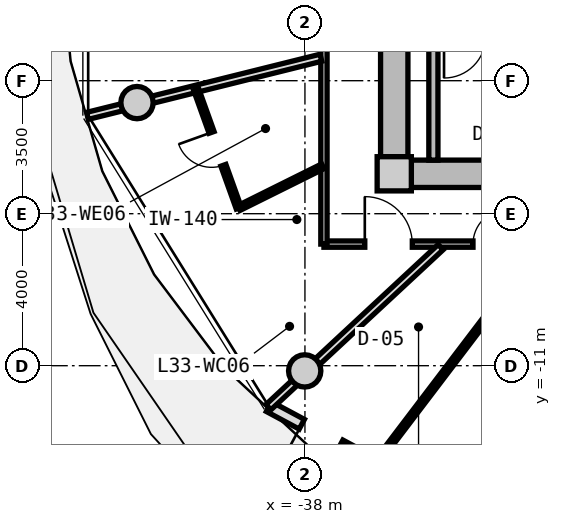
"""IFC4 building model, lengths in metres.
Left out: names, types, materials, properties, quantities, classifications, styles, units other than length and angle.
Written with IfcOpenShell. Run it as: python <this file> out.ifc"""

import sys

from ifc_helpers import new_model, si_unit, direction, frame, frame_2d, origin, origin_2d, place, context, subcontext, project, spatial, rectangle, circle, extrude, source, transform, mapped, element, fill, save


model = new_model("IFC4")
c1 = context("Model", 3, precision=1e-05, world=origin(), true_north=direction((0.0, 1.0)))
c2 = subcontext(c1, "Body", "Model", "MODEL_VIEW")
j1 = project(units=[si_unit("LENGTHUNIT", "METRE"), si_unit("PLANEANGLEUNIT", "RADIAN")], contexts=[c1])
p1 = place(None, origin())
s1 = spatial("IfcSite", under=j1, at=p1, CompositionType="ELEMENT")
p2 = place(p1, origin())
s2 = spatial("IfcBuilding", under=s1, at=p2, CompositionType="ELEMENT")
p3 = place(p2, frame((0.0, 0.0, 108.45)))
s3 = spatial("IfcBuildingStorey", under=s2, at=p3, CompositionType="ELEMENT", Elevation=108.45)
m1 = source(origin(), c2, "Body", "SweptSolid", [
    extrude(rectangle(XDim=0.9, YDim=0.9, at=origin_2d()), origin(), (0.0, 0.0, 1.0), 3.05),
])
p4 = place(p3, frame((-35.65, -5.95, 0.0), z_axis=(0.0, 0.0, 1.0), x_axis=(1.0, 0.0, 0.0)))
e1 = element("IfcColumn", 1, at=p4, inside=s3, PredefinedType="COLUMN", context=c2, shape_type="MappedRepresentation", body=[
    mapped(m1, transform((0.0, 0.0, 0.0), x_axis=(1.0, 0.0, 0.0), y_axis=(0.0, 1.0, 0.0), z_axis=(0.0, 0.0, 1.0), scale=1.0)),
])
m2 = source(origin(), c2, "Body", "SweptSolid", [
    extrude(rectangle(XDim=14.4, YDim=0.72, at=frame_2d((7.2, 0.0))), origin(), (0.0, 0.0, 1.0), 2.79),
])
p5 = place(p3, frame((-20.8, -5.95, 0.0), z_axis=(0.0, 0.0, 1.0), x_axis=(-1.0, 0.0, 0.0)))
e2 = element("IfcWall", 2, at=p5, inside=s3, PredefinedType="SHEAR", context=c2, shape_type="MappedRepresentation", body=[
    mapped(m2, transform((0.0, 0.0, 0.0), x_axis=(1.0, 0.0, 0.0), y_axis=(0.0, 1.0, 0.0), z_axis=(0.0, 0.0, 1.0), scale=1.0)),
])
m3 = source(origin(), c2, "Body", "SweptSolid", [
    extrude(rectangle(XDim=11.0, YDim=0.72, at=frame_2d((5.5, 0.0))), origin(), (0.0, 0.0, 1.0), 2.79),
])
p6 = place(p3, frame((-35.65, -5.5, 0.0), z_axis=(0.0, 0.0, 1.0), x_axis=(0.0, 1.0, 0.0)))
e3 = element("IfcWall", 3, at=p6, inside=s3, PredefinedType="SHEAR", context=c2, shape_type="MappedRepresentation", body=[
    mapped(m3, transform((0.0, 0.0, 0.0), x_axis=(1.0, 0.0, 0.0), y_axis=(0.0, 1.0, 0.0), z_axis=(0.0, 0.0, 1.0), scale=1.0)),
])
p7 = place(p6, frame((3.8, 0.0, 0.0)))
e4 = element("IfcOpeningElement", 4, at=p7, cuts=e3, PredefinedType="OPENING", context=c2, shape_type="SweptSolid", body=[
    extrude(rectangle(XDim=1.2, YDim=2.15, at=frame_2d((0.6, 1.075))), frame((0.0, 0.37, 0.0), z_axis=(0.0, -1.0, 0.0), x_axis=(1.0, 0.0, 0.0)), (0.0, 0.0, 1.0), 0.74),
])
m4 = source(origin(), c2, "Body", "SweptSolid", [
    extrude(circle(Radius=0.425, at=origin_2d()), origin(), (0.0, 0.0, 1.0), 3.05),
])
for number, where, z_axis, x_axis in (
    (5, (-42.419, -4.076, 0.0), (0.0, 0.0, 1.0), (1.0, 0.0, 0.0)),
    (6, (-38.006, -11.137, 0.0), (0.0, 0.0, 1.0), (1.0, 0.0, 0.0)),
):
    element("IfcColumn", number, at=place(p3, frame(where, z_axis=z_axis, x_axis=x_axis)), inside=s3, PredefinedType="COLUMN", context=c2, shape_type="MappedRepresentation", body=[
        mapped(m4, transform((0.0, 0.0, 0.0), x_axis=(1.0, 0.0, 0.0), y_axis=(0.0, 1.0, 0.0), z_axis=(0.0, 0.0, 1.0), scale=1.0)),
    ])
m5 = source(origin(), c2, "Body", "SweptSolid", [
    extrude(rectangle(XDim=9.351, YDim=0.29, at=frame_2d((4.675, 0.0))), origin(), (0.0, 0.0, 1.0), 2.79),
])
p8 = place(p3, frame((-30.707, -16.498, 0.0), z_axis=(0.0, 0.0, 1.0), x_axis=(-0.881184411073, 0.472772708267, 0.0)))
e7 = element("IfcWall", 7, at=p8, inside=s3, PredefinedType="SOLIDWALL", context=c2, shape_type="MappedRepresentation", body=[
    mapped(m5, transform((0.0, 0.0, 0.0), x_axis=(1.0, 0.0, 0.0), y_axis=(0.0, 1.0, 0.0), z_axis=(0.0, 0.0, 1.0), scale=1.0)),
])
p9 = place(p8, frame((7.22, 0.0, 0.0)))
e8 = element("IfcOpeningElement", 8, at=p9, cuts=e7, PredefinedType="OPENING", context=c2, shape_type="SweptSolid", body=[
    extrude(rectangle(XDim=1.15, YDim=2.25, at=frame_2d((0.575, 1.125))), frame((0.0, 0.155, 0.0), z_axis=(0.0, -1.0, 0.0), x_axis=(1.0, 0.0, 0.0)), (0.0, 0.0, 1.0), 0.31),
])
p10 = place(p8, frame((0.85, 0.0, 0.85)))
e9 = element("IfcOpeningElement", 9, at=p10, cuts=e7, PredefinedType="OPENING", context=c2, shape_type="SweptSolid", body=[
    extrude(rectangle(XDim=1.2, YDim=1.5, at=frame_2d((0.6, 0.75))), frame((0.0, 0.155, 0.0), z_axis=(0.0, -1.0, 0.0), x_axis=(1.0, 0.0, 0.0)), (0.0, 0.0, 1.0), 0.31),
])
m6 = source(origin(), c2, "Body", "SweptSolid", [
    extrude(rectangle(XDim=3.14, YDim=0.24, at=frame_2d((1.57, 0.0))), origin(), (0.0, 0.0, 1.0), 2.79),
])
p11 = place(p3, frame((-34.62, -5.59, 0.0), z_axis=(0.0, 0.0, 1.0), x_axis=(0.0, 1.0, 0.0)))
e10 = element("IfcWall", 10, at=p11, inside=s3, PredefinedType="PARTITIONING", context=c2, shape_type="MappedRepresentation", body=[
    mapped(m6, transform((0.0, 0.0, 0.0), x_axis=(1.0, 0.0, 0.0), y_axis=(0.0, 1.0, 0.0), z_axis=(0.0, 0.0, 1.0), scale=1.0)),
])
m7 = source(origin(), c2, "Body", "SweptSolid", [
    extrude(rectangle(XDim=9.234, YDim=0.165, at=frame_2d((4.617, 0.0))), origin(), (0.0, 0.0, 1.0), 2.775),
])
p12 = place(p3, frame((-28.266, -7.8, 0.0), z_axis=(0.0, 0.0, 1.0), x_axis=(-1.0, 0.0, 0.0)))
e11 = element("IfcWall", 11, at=p12, inside=s3, PredefinedType="PARTITIONING", context=c2, shape_type="MappedRepresentation", body=[
    mapped(m7, transform((0.0, 0.0, 0.0), x_axis=(1.0, 0.0, 0.0), y_axis=(0.0, 1.0, 0.0), z_axis=(0.0, 0.0, 1.0), scale=1.0)),
])
p13 = place(p12, frame((6.909, 0.0, 0.0)))
e12 = element("IfcOpeningElement", 12, at=p13, cuts=e11, PredefinedType="OPENING", context=c2, shape_type="SweptSolid", body=[
    extrude(rectangle(XDim=1.25, YDim=2.2, at=frame_2d((0.625, 1.1))), frame((0.0, 0.093, 0.0), z_axis=(0.0, -1.0, 0.0), x_axis=(1.0, 0.0, 0.0)), (0.0, 0.0, 1.0), 0.185),
])
p14 = place(p12, frame((4.392, 0.0, 0.0)))
e13 = element("IfcOpeningElement", 13, at=p14, cuts=e11, PredefinedType="OPENING", context=c2, shape_type="SweptSolid", body=[
    extrude(rectangle(XDim=0.92, YDim=2.1, at=frame_2d((0.46, 1.05))), frame((0.0, 0.093, 0.0), z_axis=(0.0, -1.0, 0.0), x_axis=(1.0, 0.0, 0.0)), (0.0, 0.0, 1.0), 0.185),
])
p15 = place(p12, frame((1.408, 0.0, 0.0)))
e14 = element("IfcOpeningElement", 14, at=p15, cuts=e11, PredefinedType="OPENING", context=c2, shape_type="SweptSolid", body=[
    extrude(rectangle(XDim=0.92, YDim=2.1, at=frame_2d((0.46, 1.05))), frame((0.0, 0.093, 0.0), z_axis=(0.0, -1.0, 0.0), x_axis=(1.0, 0.0, 0.0)), (0.0, 0.0, 1.0), 0.185),
])
m8 = source(origin(), c2, "Body", "SweptSolid", [
    extrude(rectangle(XDim=15.6, YDim=0.165, at=frame_2d((7.8, 0.0))), origin(), (0.0, 0.0, 1.0), 2.775),
])
p16 = place(p3, frame((-37.5, -7.8, 0.0), z_axis=(0.0, 0.0, 1.0), x_axis=(0.0, 1.0, 0.0)))
e15 = element("IfcWall", 15, at=p16, inside=s3, PredefinedType="PARTITIONING", context=c2, shape_type="MappedRepresentation", body=[
    mapped(m8, transform((0.0, 0.0, 0.0), x_axis=(1.0, 0.0, 0.0), y_axis=(0.0, 1.0, 0.0), z_axis=(0.0, 0.0, 1.0), scale=1.0)),
])
p17 = place(p16, frame((11.994, 0.0, 0.0)))
e16 = element("IfcOpeningElement", 16, at=p17, cuts=e15, PredefinedType="OPENING", context=c2, shape_type="SweptSolid", body=[
    extrude(rectangle(XDim=1.25, YDim=2.2, at=frame_2d((0.625, 1.1))), frame((0.0, 0.093, 0.0), z_axis=(0.0, -1.0, 0.0), x_axis=(1.0, 0.0, 0.0)), (0.0, 0.0, 1.0), 0.185),
])
p18 = place(p16, frame((7.984, 0.0, 0.0)))
e17 = element("IfcOpeningElement", 17, at=p18, cuts=e15, PredefinedType="OPENING", context=c2, shape_type="SweptSolid", body=[
    extrude(rectangle(XDim=1.05, YDim=2.15, at=frame_2d((0.525, 1.075))), frame((0.0, 0.093, 0.0), z_axis=(0.0, -1.0, 0.0), x_axis=(1.0, 0.0, 0.0)), (0.0, 0.0, 1.0), 0.185),
])
p19 = place(p16, frame((5.777, 0.0, 0.0)))
e18 = element("IfcOpeningElement", 18, at=p19, cuts=e15, PredefinedType="OPENING", context=c2, shape_type="SweptSolid", body=[
    extrude(rectangle(XDim=1.05, YDim=2.15, at=frame_2d((0.525, 1.075))), frame((0.0, 0.093, 0.0), z_axis=(0.0, -1.0, 0.0), x_axis=(1.0, 0.0, 0.0)), (0.0, 0.0, 1.0), 0.185),
])
m9 = source(origin(), c2, "Body", "SweptSolid", [
    extrude(rectangle(XDim=6.331, YDim=0.19, at=frame_2d((3.165, 0.0))), origin(), (0.0, 0.0, 1.0), 2.275),
])
p20 = place(p3, frame((-37.58, -2.896, 0.0), z_axis=(0.0, 0.0, 1.0), x_axis=(-0.97036440661, -0.241646267062, 0.0)))
e19 = element("IfcWall", 19, at=p20, inside=s3, PredefinedType="PARTITIONING", context=c2, shape_type="MappedRepresentation", body=[
    mapped(m9, transform((0.0, 0.0, 0.0), x_axis=(1.0, 0.0, 0.0), y_axis=(0.0, 1.0, 0.0), z_axis=(0.0, 0.0, 1.0), scale=1.0)),
])
m10 = source(origin(), c2, "Body", "SweptSolid", [
    extrude(rectangle(XDim=6.187, YDim=0.19, at=frame_2d((3.093, 0.0))), origin(), (0.0, 0.0, 1.0), 2.275),
])
p21 = place(p3, frame((-34.429, -7.88, 0.0), z_axis=(0.0, 0.0, 1.0), x_axis=(-0.732501077882, -0.680765870841, 0.0)))
e20 = element("IfcWall", 20, at=p21, inside=s3, PredefinedType="PARTITIONING", context=c2, shape_type="MappedRepresentation", body=[
    mapped(m10, transform((0.0, 0.0, 0.0), x_axis=(1.0, 0.0, 0.0), y_axis=(0.0, 1.0, 0.0), z_axis=(0.0, 0.0, 1.0), scale=1.0)),
])
m11 = source(origin(), c2, "Body", "SweptSolid", [
    extrude(rectangle(XDim=2.469, YDim=0.14, at=frame_2d((1.235, 0.0))), origin(), (0.0, 0.0, 1.0), 2.775),
])
p22 = place(p3, frame((-37.53, -5.754, 0.0), z_axis=(0.0, 0.0, 1.0), x_axis=(-0.895512172456, -0.445037019789, 0.0)))
e21 = element("IfcWall", 21, at=p22, inside=s3, PredefinedType="PARTITIONING", context=c2, shape_type="MappedRepresentation", body=[
    mapped(m11, transform((0.0, 0.0, 0.0), x_axis=(1.0, 0.0, 0.0), y_axis=(0.0, 1.0, 0.0), z_axis=(0.0, 0.0, 1.0), scale=1.0)),
])
m12 = source(origin(), c2, "Body", "SweptSolid", [
    extrude(rectangle(XDim=3.314, YDim=0.14, at=frame_2d((1.657, 0.0))), origin(), (0.0, 0.0, 1.0), 2.775),
])
p23 = place(p3, frame((-39.741, -6.853, 0.0), z_axis=(0.0, 0.0, 1.0), x_axis=(-0.338067217654, 0.941121966776, 0.0)))
e22 = element("IfcWall", 22, at=p23, inside=s3, PredefinedType="PARTITIONING", context=c2, shape_type="MappedRepresentation", body=[
    mapped(m12, transform((0.0, 0.0, 0.0), x_axis=(1.0, 0.0, 0.0), y_axis=(0.0, 1.0, 0.0), z_axis=(0.0, 0.0, 1.0), scale=1.0)),
])
p24 = place(p23, frame((1.197, 0.0, 0.0)))
e23 = element("IfcOpeningElement", 23, at=p24, cuts=e22, PredefinedType="OPENING", context=c2, shape_type="SweptSolid", body=[
    extrude(rectangle(XDim=0.92, YDim=2.1, at=frame_2d((0.46, 1.05))), frame((0.0, 0.08, 0.0), z_axis=(0.0, -1.0, 0.0), x_axis=(1.0, 0.0, 0.0)), (0.0, 0.0, 1.0), 0.16),
])
m13 = source(origin(), c2, "Body", "SweptSolid", [
    extrude(rectangle(XDim=7.243, YDim=0.14, at=frame_2d((3.621, 0.0))), origin(), (0.0, 0.0, 1.0), 2.775),
])
p25 = place(p3, frame((-31.774, -7.83, 0.0), z_axis=(0.0, 0.0, 1.0), x_axis=(-0.605111472002, -0.796140757939, 0.0)))
e24 = element("IfcWall", 24, at=p25, inside=s3, PredefinedType="PARTITIONING", context=c2, shape_type="MappedRepresentation", body=[
    mapped(m13, transform((0.0, 0.0, 0.0), x_axis=(1.0, 0.0, 0.0), y_axis=(0.0, 1.0, 0.0), z_axis=(0.0, 0.0, 1.0), scale=1.0)),
])
m14 = source(origin(), c2, "Body", "SweptSolid", [
    extrude(rectangle(XDim=1.15, YDim=2.25, at=frame_2d((0.575, 1.125))), frame((0.0, 0.025, 0.0), z_axis=(0.0, -1.0, 0.0), x_axis=(1.0, 0.0, 0.0)), (0.0, 0.0, 1.0), 0.05),
])
p26 = place(p9, origin())
e25 = element("IfcDoor", 25, at=p26, inside=s3, OperationType="SINGLE_SWING_RIGHT", PredefinedType="DOOR", context=c2, shape_type="MappedRepresentation", body=[
    mapped(m14, transform((0.0, 0.0, 0.0), x_axis=(1.0, 0.0, 0.0), y_axis=(0.0, 1.0, 0.0), z_axis=(0.0, 0.0, 1.0), scale=1.0)),
])
fill(e8, e25)
m15 = source(origin(), c2, "Body", "SweptSolid", [
    extrude(rectangle(XDim=1.25, YDim=2.2, at=frame_2d((0.625, 1.1))), frame((0.0, 0.025, 0.0), z_axis=(0.0, -1.0, 0.0), x_axis=(1.0, 0.0, 0.0)), (0.0, 0.0, 1.0), 0.05),
])
p27 = place(p13, frame((1.25, 0.0, 0.0), z_axis=(0.0, 0.0, 1.0), x_axis=(-1.0, 0.0, 0.0)))
e26 = element("IfcDoor", 26, at=p27, inside=s3, OperationType="SINGLE_SWING_LEFT", PredefinedType="DOOR", context=c2, shape_type="MappedRepresentation", body=[
    mapped(m15, transform((0.0, 0.0, 0.0), x_axis=(1.0, 0.0, 0.0), y_axis=(0.0, 1.0, 0.0), z_axis=(0.0, 0.0, 1.0), scale=1.0)),
])
fill(e12, e26)
m16 = source(origin(), c2, "Body", "SweptSolid", [
    extrude(rectangle(XDim=0.92, YDim=2.1, at=frame_2d((0.46, 1.05))), frame((0.0, 0.025, 0.0), z_axis=(0.0, -1.0, 0.0), x_axis=(1.0, 0.0, 0.0)), (0.0, 0.0, 1.0), 0.05),
])
p28 = place(p24, origin())
e27 = element("IfcDoor", 27, at=p28, inside=s3, OperationType="SINGLE_SWING_RIGHT", PredefinedType="DOOR", context=c2, shape_type="MappedRepresentation", body=[
    mapped(m16, transform((0.0, 0.0, 0.0), x_axis=(1.0, 0.0, 0.0), y_axis=(0.0, 1.0, 0.0), z_axis=(0.0, 0.0, 1.0), scale=1.0)),
])
fill(e23, e27)
p29 = place(p14, frame((0.92, 0.0, 0.0), z_axis=(0.0, 0.0, 1.0), x_axis=(-1.0, 0.0, 0.0)))
e28 = element("IfcDoor", 28, at=p29, inside=s3, OperationType="SINGLE_SWING_RIGHT", PredefinedType="DOOR", context=c2, shape_type="MappedRepresentation", body=[
    mapped(m16, transform((0.0, 0.0, 0.0), x_axis=(1.0, 0.0, 0.0), y_axis=(0.0, 1.0, 0.0), z_axis=(0.0, 0.0, 1.0), scale=1.0)),
])
fill(e13, e28)
save(model, sys.argv[1])
